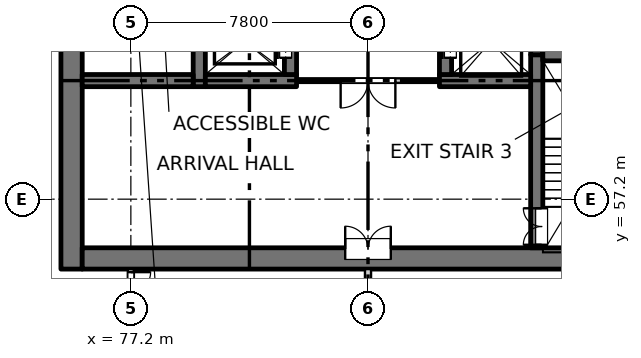
"""IFC4 building model, lengths in metres.
Left out: names, types, materials, properties, quantities, classifications, styles, units other than length and angle.
Written with IfcOpenShell. Run it as: python <this file> out.ifc"""

import sys

from ifc_helpers import new_model, si_unit, direction, frame, frame_2d, origin, place, context, subcontext, project, spatial, rectangle, extrude, element, fill, save


model = new_model("IFC4")
c1 = context("Model", 3, precision=1e-05, world=origin(), true_north=direction((0.0, 1.0)))
c2 = subcontext(c1, "Body", "Model", "MODEL_VIEW")
j1 = project(units=[si_unit("LENGTHUNIT", "METRE"), si_unit("PLANEANGLEUNIT", "RADIAN")], contexts=[c1])
p1 = place(None, origin())
s1 = spatial("IfcSite", under=j1, at=p1, CompositionType="ELEMENT")
p2 = place(p1, origin())
s2 = spatial("IfcBuilding", under=s1, at=p2, CompositionType="ELEMENT")
p3 = place(p2, origin())
s3 = spatial("IfcBuildingStorey", under=s2, at=p3, CompositionType="ELEMENT", Elevation=0.0)
p4 = place(p3, frame((75.25, 54.9, -0.4), z_axis=(0.0, 0.0, 1.0), x_axis=(0.0, 1.0, 0.0)))
e1 = element("IfcWall", 1, at=p4, inside=s3, PredefinedType="SOLIDWALL", context=c2, shape_type="SweptSolid", body=[
    extrude(rectangle(XDim=22.4, YDim=0.7, at=frame_2d((11.2, 0.0))), origin(), (0.0, 0.0, 1.0), 6.1),
])
p5 = place(p4, frame((7.55, 0.0, 0.4)))
e2 = element("IfcOpeningElement", 2, at=p5, cuts=e1, PredefinedType="OPENING", context=c2, shape_type="SweptSolid", body=[
    extrude(rectangle(XDim=0.9, YDim=2.1, at=frame_2d((0.45, 1.05))), frame((0.0, 0.36, 0.0), z_axis=(0.0, -1.0, 0.0), x_axis=(1.0, 0.0, 0.0)), (0.0, 0.0, 1.0), 0.72),
])
p6 = place(p4, frame((10.85, 0.0, 0.4)))
e3 = element("IfcOpeningElement", 3, at=p6, cuts=e1, PredefinedType="OPENING", context=c2, shape_type="SweptSolid", body=[
    extrude(rectangle(XDim=0.9, YDim=2.1, at=frame_2d((0.45, 1.05))), frame((0.0, 0.36, 0.0), z_axis=(0.0, -1.0, 0.0), x_axis=(1.0, 0.0, 0.0)), (0.0, 0.0, 1.0), 0.72),
])
p7 = place(p4, frame((13.85, 0.0, 0.4)))
e4 = element("IfcOpeningElement", 4, at=p7, cuts=e1, PredefinedType="OPENING", context=c2, shape_type="SweptSolid", body=[
    extrude(rectangle(XDim=0.9, YDim=2.1, at=frame_2d((0.45, 1.05))), frame((0.0, 0.36, 0.0), z_axis=(0.0, -1.0, 0.0), x_axis=(1.0, 0.0, 0.0)), (0.0, 0.0, 1.0), 0.72),
])
p8 = place(p4, frame((16.85, 0.0, 0.4)))
e5 = element("IfcOpeningElement", 5, at=p8, cuts=e1, PredefinedType="OPENING", context=c2, shape_type="SweptSolid", body=[
    extrude(rectangle(XDim=0.9, YDim=2.1, at=frame_2d((0.45, 1.05))), frame((0.0, 0.36, 0.0), z_axis=(0.0, -1.0, 0.0), x_axis=(1.0, 0.0, 0.0)), (0.0, 0.0, 1.0), 0.72),
])
p9 = place(p4, frame((20.15, 0.0, 0.4)))
e6 = element("IfcOpeningElement", 6, at=p9, cuts=e1, PredefinedType="OPENING", context=c2, shape_type="SweptSolid", body=[
    extrude(rectangle(XDim=0.9, YDim=2.1, at=frame_2d((0.45, 1.05))), frame((0.0, 0.36, 0.0), z_axis=(0.0, -1.0, 0.0), x_axis=(1.0, 0.0, 0.0)), (0.0, 0.0, 1.0), 0.72),
])
p10 = place(p3, frame((75.6, 55.25, -0.4), z_axis=(0.0, 0.0, 1.0), x_axis=(1.0, 0.0, 0.0)))
e7 = element("IfcWall", 7, at=p10, inside=s3, PredefinedType="SOLIDWALL", context=c2, shape_type="SweptSolid", body=[
    extrude(rectangle(XDim=18.8, YDim=0.7, at=frame_2d((9.4, 0.0))), origin(), (0.0, 0.0, 1.0), 6.1),
])
p11 = place(p10, frame((8.65, 0.0, 0.4)))
e8 = element("IfcOpeningElement", 8, at=p11, cuts=e7, PredefinedType="OPENING", context=c2, shape_type="SweptSolid", body=[
    extrude(rectangle(XDim=1.5, YDim=2.1, at=frame_2d((0.75, 1.05))), frame((0.0, 0.36, 0.0), z_axis=(0.0, -1.0, 0.0), x_axis=(1.0, 0.0, 0.0)), (0.0, 0.0, 1.0), 0.72),
])
p12 = place(p3, frame((79.45, 60.9, -0.4), z_axis=(0.0, 0.0, 1.0), x_axis=(0.0, 1.0, 0.0)))
e9 = element("IfcWall", 9, at=p12, inside=s3, PredefinedType="SOLIDWALL", context=c2, shape_type="SweptSolid", body=[
    extrude(rectangle(XDim=16.4, YDim=0.4, at=frame_2d((8.2, 0.0))), origin(), (0.0, 0.0, 1.0), 6.1),
])
p13 = place(p3, frame((90.55, 55.6, -0.4), z_axis=(0.0, 0.0, 1.0), x_axis=(0.0, 1.0, 0.0)))
e10 = element("IfcWall", 10, at=p13, inside=s3, PredefinedType="SOLIDWALL", context=c2, shape_type="SweptSolid", body=[
    extrude(rectangle(XDim=6.35, YDim=0.4, at=frame_2d((3.175, 0.0))), origin(), (0.0, 0.0, 1.0), 6.1),
])
p14 = place(p13, frame((0.1, 0.0, 0.4)))
e11 = element("IfcOpeningElement", 11, at=p14, cuts=e10, PredefinedType="OPENING", context=c2, shape_type="SweptSolid", body=[
    extrude(rectangle(XDim=1.2, YDim=2.1, at=frame_2d((0.6, 1.05))), frame((0.0, 0.21, 0.0), z_axis=(0.0, -1.0, 0.0), x_axis=(1.0, 0.0, 0.0)), (0.0, 0.0, 1.0), 0.42),
])
p15 = place(p3, frame((90.55, 61.95, -0.4), z_axis=(0.0, 0.0, 1.0), x_axis=(0.0, 1.0, 0.0)))
e12 = element("IfcWall", 12, at=p15, inside=s3, PredefinedType="SOLIDWALL", context=c2, shape_type="SweptSolid", body=[
    extrude(rectangle(XDim=15.35, YDim=0.4, at=frame_2d((7.675, 0.0))), origin(), (0.0, 0.0, 1.0), 6.1),
])
p16 = place(p3, frame((79.65, 61.1, -0.4), z_axis=(0.0, 0.0, 1.0), x_axis=(1.0, 0.0, 0.0)))
e13 = element("IfcWall", 13, at=p16, inside=s3, PredefinedType="SOLIDWALL", context=c2, shape_type="SweptSolid", body=[
    extrude(rectangle(XDim=3.0, YDim=0.4, at=frame_2d((1.5, 0.0))), origin(), (0.0, 0.0, 1.0), 6.1),
])
p17 = place(p3, frame((82.45, 61.3, -0.4), z_axis=(0.0, 0.0, 1.0), x_axis=(0.0, 1.0, 0.0)))
e14 = element("IfcWall", 14, at=p17, inside=s3, PredefinedType="SOLIDWALL", context=c2, shape_type="SweptSolid", body=[
    extrude(rectangle(XDim=2.2, YDim=0.4, at=frame_2d((1.1, 0.0))), origin(), (0.0, 0.0, 1.0), 6.1),
])
p18 = place(p17, frame((0.55, 0.0, 0.4)))
e15 = element("IfcOpeningElement", 15, at=p18, cuts=e14, PredefinedType="OPENING", context=c2, shape_type="SweptSolid", body=[
    extrude(rectangle(XDim=1.1, YDim=2.1, at=frame_2d((0.55, 1.05))), frame((0.0, 0.21, 0.0), z_axis=(0.0, -1.0, 0.0), x_axis=(1.0, 0.0, 0.0)), (0.0, 0.0, 1.0), 0.42),
])
p19 = place(p3, frame((87.35, 61.1, -0.4), z_axis=(0.0, 0.0, 1.0), x_axis=(1.0, 0.0, 0.0)))
e16 = element("IfcWall", 16, at=p19, inside=s3, PredefinedType="SOLIDWALL", context=c2, shape_type="SweptSolid", body=[
    extrude(rectangle(XDim=3.0, YDim=0.4, at=frame_2d((1.5, 0.0))), origin(), (0.0, 0.0, 1.0), 6.1),
])
p20 = place(p3, frame((87.55, 61.3, -0.4), z_axis=(0.0, 0.0, 1.0), x_axis=(0.0, 1.0, 0.0)))
e17 = element("IfcWall", 17, at=p20, inside=s3, PredefinedType="SOLIDWALL", context=c2, shape_type="SweptSolid", body=[
    extrude(rectangle(XDim=2.2, YDim=0.4, at=frame_2d((1.1, 0.0))), origin(), (0.0, 0.0, 1.0), 6.1),
])
p21 = place(p20, frame((0.55, 0.0, 0.4)))
e18 = element("IfcOpeningElement", 18, at=p21, cuts=e17, PredefinedType="OPENING", context=c2, shape_type="SweptSolid", body=[
    extrude(rectangle(XDim=1.1, YDim=2.1, at=frame_2d((0.55, 1.05))), frame((0.0, 0.21, 0.0), z_axis=(0.0, -1.0, 0.0), x_axis=(1.0, 0.0, 0.0)), (0.0, 0.0, 1.0), 0.42),
])
for number, where, z_axis, x_axis in (
    (19, (75.6, 61.1, -0.4), (0.0, 0.0, 1.0), (1.0, 0.0, 0.0)),
    (20, (90.75, 61.95, -0.4), (0.0, 0.0, 1.0), (1.0, 0.0, 0.0)),
):
    element("IfcWall", number, at=place(p3, frame(where, z_axis=z_axis, x_axis=x_axis)), inside=s3, PredefinedType="SOLIDWALL", context=c2, shape_type="SweptSolid", body=[
        extrude(rectangle(XDim=3.65, YDim=0.4, at=frame_2d((1.825, 0.0))), origin(), (0.0, 0.0, 1.0), 6.1),
    ])
p22 = place(p3, frame((82.65, 61.1, 0.0), z_axis=(0.0, 0.0, 1.0), x_axis=(1.0, 0.0, 0.0)))
e21 = element("IfcWall", 21, at=p22, inside=s3, PredefinedType="PARTITIONING", context=c2, shape_type="SweptSolid", body=[
    extrude(rectangle(XDim=4.7, YDim=0.15, at=frame_2d((2.35, 0.0))), origin(), (0.0, 0.0, 1.0), 5.7),
])
p23 = place(p22, frame((1.45, 0.0, 0.0)))
e22 = element("IfcOpeningElement", 22, at=p23, cuts=e21, PredefinedType="OPENING", context=c2, shape_type="SweptSolid", body=[
    extrude(rectangle(XDim=1.8, YDim=2.1, at=frame_2d((0.9, 1.05))), frame((0.0, 0.085, 0.0), z_axis=(0.0, -1.0, 0.0), x_axis=(1.0, 0.0, 0.0)), (0.0, 0.0, 1.0), 0.17),
])
p24 = place(p3, frame((77.2, 53.4, 0.0), z_axis=(0.0, 0.0, 1.0), x_axis=(0.0, 1.0, 0.0)))
e23 = element("IfcWall", 23, at=p24, inside=s3, PredefinedType="PARTITIONING", context=c2, shape_type="SweptSolid", body=[
    extrude(rectangle(XDim=1.5, YDim=0.2, at=frame_2d((0.75, 0.0))), origin(), (0.0, 0.0, 1.0), 5.7),
])
p25 = place(p24, frame((0.1, 0.0, 0.0)))
e24 = element("IfcOpeningElement", 24, at=p25, cuts=e23, PredefinedType="OPENING", context=c2, shape_type="SweptSolid", body=[
    extrude(rectangle(XDim=1.3, YDim=2.1, at=frame_2d((0.65, 1.05))), frame((0.0, 0.11, 0.0), z_axis=(0.0, -1.0, 0.0), x_axis=(1.0, 0.0, 0.0)), (0.0, 0.0, 1.0), 0.22),
])
p26 = place(p3, frame((85.0, 30.0, 0.0), z_axis=(0.0, 0.0, 1.0), x_axis=(0.0, 1.0, 0.0)))
e25 = element("IfcWall", 25, at=p26, inside=s3, PredefinedType="PARTITIONING", context=c2, shape_type="SweptSolid", body=[
    extrude(rectangle(XDim=24.9, YDim=0.2, at=frame_2d((12.45, 0.0))), origin(), (0.0, 0.0, 1.0), 5.7),
])
p27 = place(p25, origin())
e26 = element("IfcDoor", 26, at=p27, inside=s3, OperationType="DOUBLE_DOOR_SINGLE_SWING", PredefinedType="DOOR", context=c2, shape_type="SweptSolid", body=[
    extrude(rectangle(XDim=1.3, YDim=2.1, at=frame_2d((0.65, 1.05))), frame((0.0, 0.025, 0.0), z_axis=(0.0, -1.0, 0.0), x_axis=(1.0, 0.0, 0.0)), (0.0, 0.0, 1.0), 0.05),
])
fill(e24, e26)
p28 = place(p11, origin())
e27 = element("IfcDoor", 27, at=p28, inside=s3, OperationType="DOUBLE_DOOR_SINGLE_SWING", PredefinedType="DOOR", context=c2, shape_type="SweptSolid", body=[
    extrude(rectangle(XDim=1.5, YDim=2.1, at=frame_2d((0.75, 1.05))), frame((0.0, 0.335, 0.0), z_axis=(0.0, -1.0, 0.0), x_axis=(1.0, 0.0, 0.0)), (0.0, 0.0, 1.0), 0.05),
])
fill(e8, e27)
p29 = place(p14, origin())
e28 = element("IfcDoor", 28, at=p29, inside=s3, OperationType="DOUBLE_DOOR_SINGLE_SWING", PredefinedType="DOOR", context=c2, shape_type="SweptSolid", body=[
    extrude(rectangle(XDim=1.2, YDim=2.1, at=frame_2d((0.6, 1.05))), frame((0.0, -0.135, 0.0), z_axis=(0.0, -1.0, 0.0), x_axis=(1.0, 0.0, 0.0)), (0.0, 0.0, 1.0), 0.05),
])
fill(e11, e28)
p30 = place(p23, origin())
e29 = element("IfcDoor", 29, at=p30, inside=s3, OperationType="DOUBLE_DOOR_SINGLE_SWING", PredefinedType="DOOR", context=c2, shape_type="SweptSolid", body=[
    extrude(rectangle(XDim=1.8, YDim=2.1, at=frame_2d((0.9, 1.05))), frame((0.0, 0.025, 0.0), z_axis=(0.0, -1.0, 0.0), x_axis=(1.0, 0.0, 0.0)), (0.0, 0.0, 1.0), 0.05),
])
fill(e22, e29)
p31 = place(p18, origin())
e30 = element("IfcDoor", 30, at=p31, inside=s3, OperationType="SLIDING_TO_RIGHT", PredefinedType="DOOR", context=c2, shape_type="SweptSolid", body=[
    extrude(rectangle(XDim=1.1, YDim=2.1, at=frame_2d((0.55, 1.05))), frame((0.0, 0.185, 0.0), z_axis=(0.0, -1.0, 0.0), x_axis=(1.0, 0.0, 0.0)), (0.0, 0.0, 1.0), 0.05),
])
fill(e15, e30)
p32 = place(p21, origin())
e31 = element("IfcDoor", 31, at=p32, inside=s3, OperationType="SLIDING_TO_RIGHT", PredefinedType="DOOR", context=c2, shape_type="SweptSolid", body=[
    extrude(rectangle(XDim=1.1, YDim=2.1, at=frame_2d((0.55, 1.05))), frame((0.0, -0.135, 0.0), z_axis=(0.0, -1.0, 0.0), x_axis=(1.0, 0.0, 0.0)), (0.0, 0.0, 1.0), 0.05),
])
fill(e18, e31)
save(model, sys.argv[1])
